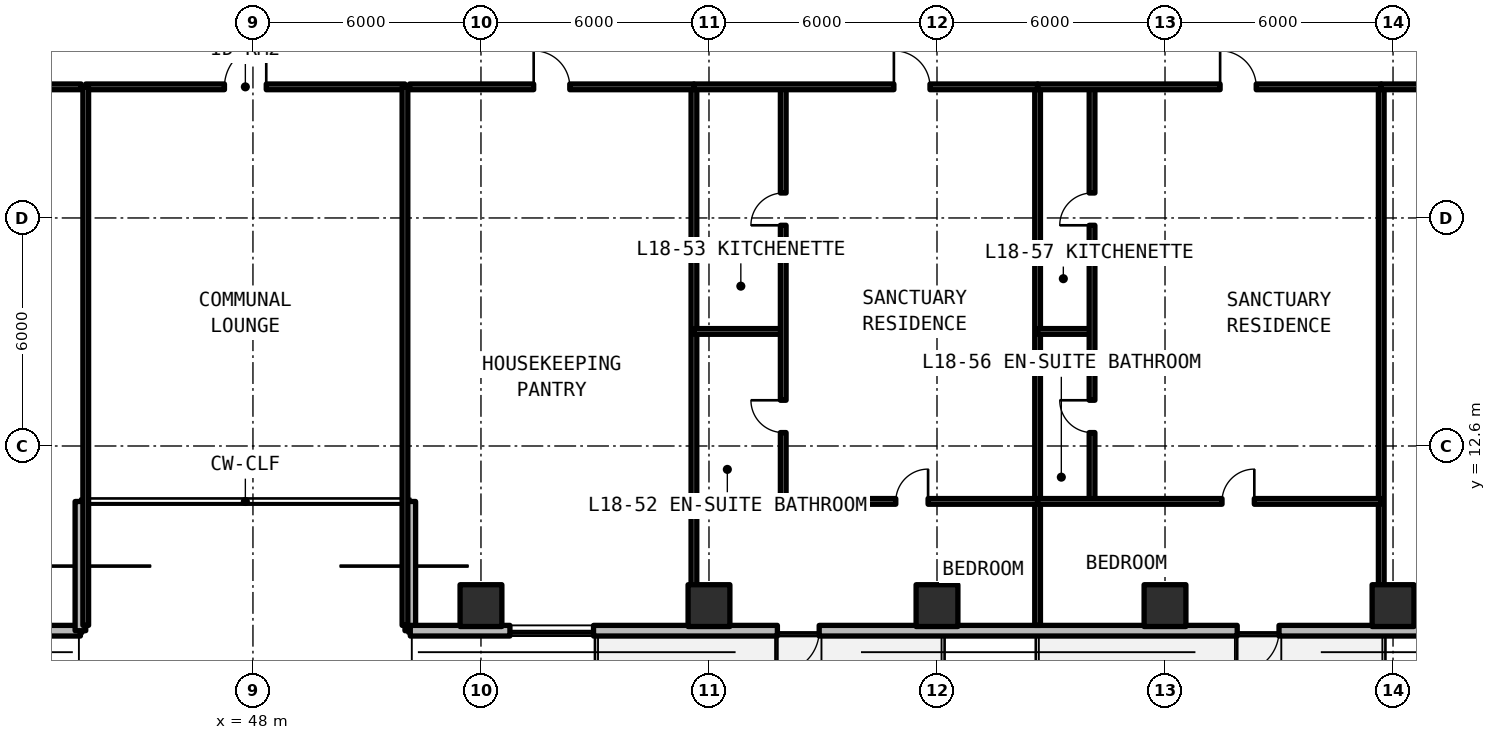
"""IFC4 building model, lengths in metres.
Left out: names, types, materials, properties, quantities, classifications, styles, units other than length and angle.
Written with IfcOpenShell. Run it as: python <this file> out.ifc"""

import sys

from ifc_helpers import new_model, si_unit, direction, frame, frame_2d, origin, origin_2d, place, context, subcontext, project, spatial, rectangle, extrude, element, fill, save


model = new_model("IFC4")
c1 = context("Model", 3, precision=1e-05, world=origin(), true_north=direction((0.0, 1.0)))
c2 = subcontext(c1, "Body", "Model", "MODEL_VIEW")
j1 = project(units=[si_unit("LENGTHUNIT", "METRE"), si_unit("PLANEANGLEUNIT", "RADIAN")], contexts=[c1])
p1 = place(None, origin())
s1 = spatial("IfcSite", under=j1, at=p1, CompositionType="ELEMENT")
p2 = place(p1, origin())
s2 = spatial("IfcBuilding", under=s1, at=p2, CompositionType="ELEMENT")
p3 = place(p2, frame((0.0, 0.0, 66.0)))
s3 = spatial("IfcBuildingStorey", under=s2, at=p3, CompositionType="ELEMENT", Elevation=66.0)
for number, where, z_axis, x_axis in (
    (1, (54.0, 8.4, 0.0), (0.0, 0.0, 1.0), (1.0, 0.0, 0.0)),
    (2, (60.0, 8.4, 0.0), (0.0, 0.0, 1.0), (1.0, 0.0, 0.0)),
    (3, (66.0, 8.4, 0.0), (0.0, 0.0, 1.0), (1.0, 0.0, 0.0)),
    (4, (72.0, 8.4, 0.0), (0.0, 0.0, 1.0), (1.0, 0.0, 0.0)),
    (5, (78.0, 8.4, 0.0), (0.0, 0.0, 1.0), (1.0, 0.0, 0.0)),
):
    element("IfcColumn", number, at=place(p3, frame(where, z_axis=z_axis, x_axis=x_axis)), inside=s3, PredefinedType="COLUMN", context=c2, shape_type="SweptSolid", body=[
        extrude(rectangle(XDim=1.1, YDim=1.1, at=origin_2d()), origin(), (0.0, 0.0, 1.0), 3.63),
    ])
p4 = place(p3, frame((20.858, 7.74, 0.0), z_axis=(0.0, 0.0, 1.0), x_axis=(1.0, 0.0, 0.0)))
e6 = element("IfcWall", 6, at=p4, inside=s3, PredefinedType="SOLIDWALL", context=c2, shape_type="SweptSolid", body=[
    extrude(rectangle(XDim=22.602, YDim=0.28, at=frame_2d((11.301, 0.0))), origin(), (0.0, 0.0, 1.0), 3.41),
])
p5 = place(p4, frame((6.142, 0.0, 0.0)))
e7 = element("IfcOpeningElement", 7, at=p5, cuts=e6, PredefinedType="OPENING", context=c2, shape_type="SweptSolid", body=[
    extrude(rectangle(XDim=1.1, YDim=2.15, at=frame_2d((0.55, 1.075))), frame((0.0, 0.15, 0.0), z_axis=(0.0, -1.0, 0.0), x_axis=(1.0, 0.0, 0.0)), (0.0, 0.0, 1.0), 0.3),
])
p6 = place(p4, frame((0.879, 0.0, 0.78)))
e8 = element("IfcOpeningElement", 8, at=p6, cuts=e6, PredefinedType="OPENING", context=c2, shape_type="SweptSolid", body=[
    extrude(rectangle(XDim=1.4, YDim=1.65, at=frame_2d((0.7, 0.825))), frame((0.0, 0.15, 0.0), z_axis=(0.0, -1.0, 0.0), x_axis=(1.0, 0.0, 0.0)), (0.0, 0.0, 1.0), 0.3),
])
p7 = place(p4, frame((12.827, 0.0, 0.78)))
e9 = element("IfcOpeningElement", 9, at=p7, cuts=e6, PredefinedType="OPENING", context=c2, shape_type="SweptSolid", body=[
    extrude(rectangle(XDim=1.4, YDim=1.65, at=frame_2d((0.7, 0.825))), frame((0.0, 0.15, 0.0), z_axis=(0.0, -1.0, 0.0), x_axis=(1.0, 0.0, 0.0)), (0.0, 0.0, 1.0), 0.3),
])
p8 = place(p4, frame((18.165, 0.0, 0.78)))
e10 = element("IfcOpeningElement", 10, at=p8, cuts=e6, PredefinedType="OPENING", context=c2, shape_type="SweptSolid", body=[
    extrude(rectangle(XDim=2.2, YDim=1.66, at=frame_2d((1.1, 0.83))), frame((0.0, 0.15, 0.0), z_axis=(0.0, -1.0, 0.0), x_axis=(1.0, 0.0, 0.0)), (0.0, 0.0, 1.0), 0.3),
])
for number, where, z_axis, x_axis in (
    (11, (43.46, 7.74, 0.0), (0.0, 0.0, 1.0), (0.0, 1.0, 0.0)),
    (12, (52.14, 11.14, 0.0), (0.0, 0.0, 1.0), (0.0, -1.0, 0.0)),
):
    element("IfcWall", number, at=place(p3, frame(where, z_axis=z_axis, x_axis=x_axis)), inside=s3, PredefinedType="SOLIDWALL", context=c2, shape_type="SweptSolid", body=[
        extrude(rectangle(XDim=3.4, YDim=0.28, at=frame_2d((1.7, 0.0))), origin(), (0.0, 0.0, 1.0), 3.41),
    ])
p9 = place(p3, frame((52.14, 7.74, 0.0), z_axis=(0.0, 0.0, 1.0), x_axis=(1.0, 0.0, 0.0)))
e13 = element("IfcWall", 13, at=p9, inside=s3, PredefinedType="SOLIDWALL", context=c2, shape_type="SweptSolid", body=[
    extrude(rectangle(XDim=44.402, YDim=0.28, at=frame_2d((22.201, 0.0))), origin(), (0.0, 0.0, 1.0), 3.41),
])
p10 = place(p9, frame((9.66, 0.0, 0.0)))
e14 = element("IfcOpeningElement", 14, at=p10, cuts=e13, PredefinedType="OPENING", context=c2, shape_type="SweptSolid", body=[
    extrude(rectangle(XDim=1.1, YDim=2.15, at=frame_2d((0.55, 1.075))), frame((0.0, 0.15, 0.0), z_axis=(0.0, -1.0, 0.0), x_axis=(1.0, 0.0, 0.0)), (0.0, 0.0, 1.0), 0.3),
])
p11 = place(p9, frame((21.76, 0.0, 0.0)))
e15 = element("IfcOpeningElement", 15, at=p11, cuts=e13, PredefinedType="OPENING", context=c2, shape_type="SweptSolid", body=[
    extrude(rectangle(XDim=1.1, YDim=2.15, at=frame_2d((0.55, 1.075))), frame((0.0, 0.15, 0.0), z_axis=(0.0, -1.0, 0.0), x_axis=(1.0, 0.0, 0.0)), (0.0, 0.0, 1.0), 0.3),
])
p12 = place(p9, frame((33.61, 0.0, 0.0)))
e16 = element("IfcOpeningElement", 16, at=p12, cuts=e13, PredefinedType="OPENING", context=c2, shape_type="SweptSolid", body=[
    extrude(rectangle(XDim=1.1, YDim=2.15, at=frame_2d((0.55, 1.075))), frame((0.0, 0.15, 0.0), z_axis=(0.0, -1.0, 0.0), x_axis=(1.0, 0.0, 0.0)), (0.0, 0.0, 1.0), 0.3),
])
p13 = place(p9, frame((2.622, 0.0, 0.78)))
e17 = element("IfcOpeningElement", 17, at=p13, cuts=e13, PredefinedType="OPENING", context=c2, shape_type="SweptSolid", body=[
    extrude(rectangle(XDim=2.2, YDim=1.66, at=frame_2d((1.1, 0.83))), frame((0.0, 0.15, 0.0), z_axis=(0.0, -1.0, 0.0), x_axis=(1.0, 0.0, 0.0)), (0.0, 0.0, 1.0), 0.3),
])
p14 = place(p9, frame((38.638, 0.0, 0.78)))
e18 = element("IfcOpeningElement", 18, at=p14, cuts=e13, PredefinedType="OPENING", context=c2, shape_type="SweptSolid", body=[
    extrude(rectangle(XDim=2.2, YDim=1.66, at=frame_2d((1.1, 0.83))), frame((0.0, 0.15, 0.0), z_axis=(0.0, -1.0, 0.0), x_axis=(1.0, 0.0, 0.0)), (0.0, 0.0, 1.0), 0.3),
])
p15 = place(p3, frame((43.6, 22.05, 0.0), z_axis=(0.0, 0.0, 1.0), x_axis=(1.0, 0.0, 0.0)))
e19 = element("IfcWall", 19, at=p15, inside=s3, PredefinedType="SOLIDWALL", context=c2, shape_type="SweptSolid", body=[
    extrude(rectangle(XDim=8.4, YDim=0.15, at=frame_2d((4.2, 0.0))), origin(), (0.0, 0.0, 1.0), 2.63),
])
p16 = place(p15, frame((3.65, 0.0, 0.0)))
e20 = element("IfcOpeningElement", 20, at=p16, cuts=e19, PredefinedType="OPENING", context=c2, shape_type="SweptSolid", body=[
    extrude(rectangle(XDim=1.1, YDim=2.15, at=frame_2d((0.55, 1.075))), frame((0.0, 0.085, 0.0), z_axis=(0.0, -1.0, 0.0), x_axis=(1.0, 0.0, 0.0)), (0.0, 0.0, 1.0), 0.17),
])
for number, where, z_axis, x_axis in (
    (21, (43.6, 7.88, 0.0), (0.0, 0.0, 1.0), (0.0, 1.0, 0.0)),
    (22, (52.0, 7.88, 0.0), (0.0, 0.0, 1.0), (0.0, 1.0, 0.0)),
):
    element("IfcWall", number, at=place(p3, frame(where, z_axis=z_axis, x_axis=x_axis)), inside=s3, PredefinedType="SOLIDWALL", context=c2, shape_type="SweptSolid", body=[
        extrude(rectangle(XDim=14.17, YDim=0.15, at=frame_2d((7.085, 0.0))), origin(), (0.0, 0.0, 1.0), 2.63),
    ])
p17 = place(p3, frame((38.046, 22.05, 0.0), z_axis=(0.0, 0.0, 1.0), x_axis=(1.0, 0.0, 0.0)))
e23 = element("IfcWall", 23, at=p17, inside=s3, PredefinedType="SOLIDWALL", context=c2, shape_type="SweptSolid", body=[
    extrude(rectangle(XDim=5.434, YDim=0.15, at=frame_2d((2.717, 0.0))), origin(), (0.0, 0.0, 1.0), 2.63),
])
p18 = place(p17, frame((2.167, 0.0, 0.0)))
e24 = element("IfcOpeningElement", 24, at=p18, cuts=e23, PredefinedType="OPENING", context=c2, shape_type="SweptSolid", body=[
    extrude(rectangle(XDim=1.1, YDim=2.15, at=frame_2d((0.55, 1.075))), frame((0.0, 0.085, 0.0), z_axis=(0.0, -1.0, 0.0), x_axis=(1.0, 0.0, 0.0)), (0.0, 0.0, 1.0), 0.17),
])
p19 = place(p3, frame((59.604, 7.88, 0.0), z_axis=(0.0, 0.0, 1.0), x_axis=(0.0, 1.0, 0.0)))
e25 = element("IfcWall", 25, at=p19, inside=s3, PredefinedType="SOLIDWALL", context=c2, shape_type="SweptSolid", body=[
    extrude(rectangle(XDim=14.17, YDim=0.15, at=frame_2d((7.085, 0.0))), origin(), (0.0, 0.0, 1.0), 2.63),
])
p20 = place(p3, frame((52.12, 22.05, 0.0), z_axis=(0.0, 0.0, 1.0), x_axis=(1.0, 0.0, 0.0)))
e26 = element("IfcWall", 26, at=p20, inside=s3, PredefinedType="SOLIDWALL", context=c2, shape_type="SweptSolid", body=[
    extrude(rectangle(XDim=7.484, YDim=0.15, at=frame_2d((3.742, 0.0))), origin(), (0.0, 0.0, 1.0), 2.63),
])
p21 = place(p20, frame((3.267, 0.0, 0.0)))
e27 = element("IfcOpeningElement", 27, at=p21, cuts=e26, PredefinedType="OPENING", context=c2, shape_type="SweptSolid", body=[
    extrude(rectangle(XDim=0.95, YDim=2.15, at=frame_2d((0.475, 1.075))), frame((0.0, 0.085, 0.0), z_axis=(0.0, -1.0, 0.0), x_axis=(1.0, 0.0, 0.0)), (0.0, 0.0, 1.0), 0.17),
])
p22 = place(p3, frame((68.647, 7.88, 0.0), z_axis=(0.0, 0.0, 1.0), x_axis=(0.0, 1.0, 0.0)))
e28 = element("IfcWall", 28, at=p22, inside=s3, PredefinedType="SOLIDWALL", context=c2, shape_type="SweptSolid", body=[
    extrude(rectangle(XDim=14.17, YDim=0.15, at=frame_2d((7.085, 0.0))), origin(), (0.0, 0.0, 1.0), 2.63),
])
p23 = place(p3, frame((59.604, 15.615, 0.0), z_axis=(0.0, 0.0, 1.0), x_axis=(1.0, 0.0, 0.0)))
e29 = element("IfcWall", 29, at=p23, inside=s3, PredefinedType="PARTITIONING", context=c2, shape_type="SweptSolid", body=[
    extrude(rectangle(XDim=2.35, YDim=0.15, at=frame_2d((1.175, 0.0))), origin(), (0.0, 0.0, 1.0), 2.63),
])
p24 = place(p3, frame((61.954, 11.142, 0.0), z_axis=(0.0, 0.0, 1.0), x_axis=(0.0, 1.0, 0.0)))
e30 = element("IfcWall", 30, at=p24, inside=s3, PredefinedType="PARTITIONING", context=c2, shape_type="SweptSolid", body=[
    extrude(rectangle(XDim=10.908, YDim=0.15, at=frame_2d((5.454, 0.0))), origin(), (0.0, 0.0, 1.0), 2.63),
])
p25 = place(p24, frame((1.811, 0.0, 0.0)))
e31 = element("IfcOpeningElement", 31, at=p25, cuts=e30, PredefinedType="OPENING", context=c2, shape_type="SweptSolid", body=[
    extrude(rectangle(XDim=0.85, YDim=2.1, at=frame_2d((0.425, 1.05))), frame((0.0, 0.085, 0.0), z_axis=(0.0, -1.0, 0.0), x_axis=(1.0, 0.0, 0.0)), (0.0, 0.0, 1.0), 0.17),
])
p26 = place(p24, frame((7.265, 0.0, 0.0)))
e32 = element("IfcOpeningElement", 32, at=p26, cuts=e30, PredefinedType="OPENING", context=c2, shape_type="SweptSolid", body=[
    extrude(rectangle(XDim=0.85, YDim=2.1, at=frame_2d((0.425, 1.05))), frame((0.0, 0.085, 0.0), z_axis=(0.0, -1.0, 0.0), x_axis=(1.0, 0.0, 0.0)), (0.0, 0.0, 1.0), 0.17),
])
p27 = place(p3, frame((59.604, 11.142, 0.0), z_axis=(0.0, 0.0, 1.0), x_axis=(1.0, 0.0, 0.0)))
e33 = element("IfcWall", 33, at=p27, inside=s3, PredefinedType="PARTITIONING", context=c2, shape_type="SweptSolid", body=[
    extrude(rectangle(XDim=9.043, YDim=0.15, at=frame_2d((4.521, 0.0))), origin(), (0.0, 0.0, 1.0), 2.63),
])
p28 = place(p27, frame((5.312, 0.0, 0.0)))
e34 = element("IfcOpeningElement", 34, at=p28, cuts=e33, PredefinedType="OPENING", context=c2, shape_type="SweptSolid", body=[
    extrude(rectangle(XDim=0.85, YDim=2.1, at=frame_2d((0.425, 1.05))), frame((0.0, 0.085, 0.0), z_axis=(0.0, -1.0, 0.0), x_axis=(1.0, 0.0, 0.0)), (0.0, 0.0, 1.0), 0.17),
])
p29 = place(p3, frame((59.604, 22.05, 0.0), z_axis=(0.0, 0.0, 1.0), x_axis=(1.0, 0.0, 0.0)))
e35 = element("IfcWall", 35, at=p29, inside=s3, PredefinedType="SOLIDWALL", context=c2, shape_type="SweptSolid", body=[
    extrude(rectangle(XDim=9.043, YDim=0.15, at=frame_2d((4.521, 0.0))), origin(), (0.0, 0.0, 1.0), 2.63),
])
p30 = place(p29, frame((5.262, 0.0, 0.0)))
e36 = element("IfcOpeningElement", 36, at=p30, cuts=e35, PredefinedType="OPENING", context=c2, shape_type="SweptSolid", body=[
    extrude(rectangle(XDim=0.95, YDim=2.15, at=frame_2d((0.475, 1.075))), frame((0.0, 0.085, 0.0), z_axis=(0.0, -1.0, 0.0), x_axis=(1.0, 0.0, 0.0)), (0.0, 0.0, 1.0), 0.17),
])
p31 = place(p3, frame((77.69, 7.88, 0.0), z_axis=(0.0, 0.0, 1.0), x_axis=(0.0, 1.0, 0.0)))
e37 = element("IfcWall", 37, at=p31, inside=s3, PredefinedType="SOLIDWALL", context=c2, shape_type="SweptSolid", body=[
    extrude(rectangle(XDim=14.17, YDim=0.15, at=frame_2d((7.085, 0.0))), origin(), (0.0, 0.0, 1.0), 2.63),
])
p32 = place(p3, frame((68.647, 15.615, 0.0), z_axis=(0.0, 0.0, 1.0), x_axis=(1.0, 0.0, 0.0)))
e38 = element("IfcWall", 38, at=p32, inside=s3, PredefinedType="PARTITIONING", context=c2, shape_type="SweptSolid", body=[
    extrude(rectangle(XDim=1.433, YDim=0.15, at=frame_2d((0.717, 0.0))), origin(), (0.0, 0.0, 1.0), 2.63),
])
p33 = place(p3, frame((70.08, 11.142, 0.0), z_axis=(0.0, 0.0, 1.0), x_axis=(0.0, 1.0, 0.0)))
e39 = element("IfcWall", 39, at=p33, inside=s3, PredefinedType="PARTITIONING", context=c2, shape_type="SweptSolid", body=[
    extrude(rectangle(XDim=10.908, YDim=0.15, at=frame_2d((5.454, 0.0))), origin(), (0.0, 0.0, 1.0), 2.63),
])
p34 = place(p33, frame((1.811, 0.0, 0.0)))
e40 = element("IfcOpeningElement", 40, at=p34, cuts=e39, PredefinedType="OPENING", context=c2, shape_type="SweptSolid", body=[
    extrude(rectangle(XDim=0.85, YDim=2.1, at=frame_2d((0.425, 1.05))), frame((0.0, 0.085, 0.0), z_axis=(0.0, -1.0, 0.0), x_axis=(1.0, 0.0, 0.0)), (0.0, 0.0, 1.0), 0.17),
])
p35 = place(p33, frame((7.265, 0.0, 0.0)))
e41 = element("IfcOpeningElement", 41, at=p35, cuts=e39, PredefinedType="OPENING", context=c2, shape_type="SweptSolid", body=[
    extrude(rectangle(XDim=0.85, YDim=2.1, at=frame_2d((0.425, 1.05))), frame((0.0, 0.085, 0.0), z_axis=(0.0, -1.0, 0.0), x_axis=(1.0, 0.0, 0.0)), (0.0, 0.0, 1.0), 0.17),
])
p36 = place(p3, frame((68.647, 11.142, 0.0), z_axis=(0.0, 0.0, 1.0), x_axis=(1.0, 0.0, 0.0)))
e42 = element("IfcWall", 42, at=p36, inside=s3, PredefinedType="PARTITIONING", context=c2, shape_type="SweptSolid", body=[
    extrude(rectangle(XDim=9.043, YDim=0.15, at=frame_2d((4.521, 0.0))), origin(), (0.0, 0.0, 1.0), 2.63),
])
p37 = place(p36, frame((4.853, 0.0, 0.0)))
e43 = element("IfcOpeningElement", 43, at=p37, cuts=e42, PredefinedType="OPENING", context=c2, shape_type="SweptSolid", body=[
    extrude(rectangle(XDim=0.85, YDim=2.1, at=frame_2d((0.425, 1.05))), frame((0.0, 0.085, 0.0), z_axis=(0.0, -1.0, 0.0), x_axis=(1.0, 0.0, 0.0)), (0.0, 0.0, 1.0), 0.17),
])
p38 = place(p3, frame((68.647, 22.05, 0.0), z_axis=(0.0, 0.0, 1.0), x_axis=(1.0, 0.0, 0.0)))
e44 = element("IfcWall", 44, at=p38, inside=s3, PredefinedType="SOLIDWALL", context=c2, shape_type="SweptSolid", body=[
    extrude(rectangle(XDim=9.043, YDim=0.15, at=frame_2d((4.521, 0.0))), origin(), (0.0, 0.0, 1.0), 2.63),
])
p39 = place(p38, frame((4.803, 0.0, 0.0)))
e45 = element("IfcOpeningElement", 45, at=p39, cuts=e44, PredefinedType="OPENING", context=c2, shape_type="SweptSolid", body=[
    extrude(rectangle(XDim=0.95, YDim=2.15, at=frame_2d((0.475, 1.075))), frame((0.0, 0.085, 0.0), z_axis=(0.0, -1.0, 0.0), x_axis=(1.0, 0.0, 0.0)), (0.0, 0.0, 1.0), 0.17),
])
p40 = place(p3, frame((77.69, 22.05, 0.0), z_axis=(0.0, 0.0, 1.0), x_axis=(1.0, 0.0, 0.0)))
e46 = element("IfcWall", 46, at=p40, inside=s3, PredefinedType="SOLIDWALL", context=c2, shape_type="SweptSolid", body=[
    extrude(rectangle(XDim=9.667, YDim=0.15, at=frame_2d((4.833, 0.0))), origin(), (0.0, 0.0, 1.0), 2.63),
])
p41 = place(p40, frame((4.283, 0.0, 0.0)))
e47 = element("IfcOpeningElement", 47, at=p41, cuts=e46, PredefinedType="OPENING", context=c2, shape_type="SweptSolid", body=[
    extrude(rectangle(XDim=1.1, YDim=2.15, at=frame_2d((0.55, 1.075))), frame((0.0, 0.085, 0.0), z_axis=(0.0, -1.0, 0.0), x_axis=(1.0, 0.0, 0.0)), (0.0, 0.0, 1.0), 0.17),
])
p42 = place(p10, frame((1.1, 0.0, 0.0), z_axis=(0.0, 0.0, 1.0), x_axis=(-1.0, 0.0, 0.0)))
e48 = element("IfcDoor", 48, at=p42, inside=s3, OperationType="SINGLE_SWING_LEFT", PredefinedType="DOOR", context=c2, shape_type="SweptSolid", body=[
    extrude(rectangle(XDim=1.1, YDim=2.15, at=frame_2d((0.55, 1.075))), frame((0.0, 0.025, 0.0), z_axis=(0.0, -1.0, 0.0), x_axis=(1.0, 0.0, 0.0)), (0.0, 0.0, 1.0), 0.05),
])
fill(e14, e48)
p43 = place(p11, frame((1.1, 0.0, 0.0), z_axis=(0.0, 0.0, 1.0), x_axis=(-1.0, 0.0, 0.0)))
e49 = element("IfcDoor", 49, at=p43, inside=s3, OperationType="SINGLE_SWING_RIGHT", PredefinedType="DOOR", context=c2, shape_type="SweptSolid", body=[
    extrude(rectangle(XDim=1.1, YDim=2.15, at=frame_2d((0.55, 1.075))), frame((0.0, 0.025, 0.0), z_axis=(0.0, -1.0, 0.0), x_axis=(1.0, 0.0, 0.0)), (0.0, 0.0, 1.0), 0.05),
])
fill(e15, e49)
p44 = place(p13, origin())
e50 = element("IfcWindow", 50, at=p44, inside=s3, PartitioningType="SINGLE_PANEL", PredefinedType="WINDOW", context=c2, shape_type="SweptSolid", body=[
    extrude(rectangle(XDim=2.2, YDim=1.66, at=frame_2d((1.1, 0.83))), frame((0.0, 0.03, 0.0), z_axis=(0.0, -1.0, 0.0), x_axis=(1.0, 0.0, 0.0)), (0.0, 0.0, 1.0), 0.06),
])
fill(e17, e50)
p45 = place(p16, origin())
e51 = element("IfcDoor", 51, at=p45, inside=s3, OperationType="SINGLE_SWING_RIGHT", PredefinedType="DOOR", context=c2, shape_type="SweptSolid", body=[
    extrude(rectangle(XDim=1.1, YDim=2.15, at=frame_2d((0.55, 1.075))), frame((0.0, 0.025, 0.0), z_axis=(0.0, -1.0, 0.0), x_axis=(1.0, 0.0, 0.0)), (0.0, 0.0, 1.0), 0.05),
])
fill(e20, e51)
p46 = place(p21, origin())
e52 = element("IfcDoor", 52, at=p46, inside=s3, OperationType="SINGLE_SWING_LEFT", PredefinedType="DOOR", context=c2, shape_type="SweptSolid", body=[
    extrude(rectangle(XDim=0.95, YDim=2.15, at=frame_2d((0.475, 1.075))), frame((0.0, 0.025, 0.0), z_axis=(0.0, -1.0, 0.0), x_axis=(1.0, 0.0, 0.0)), (0.0, 0.0, 1.0), 0.05),
])
fill(e27, e52)
p47 = place(p25, origin())
e53 = element("IfcDoor", 53, at=p47, inside=s3, OperationType="SINGLE_SWING_RIGHT", PredefinedType="DOOR", context=c2, shape_type="SweptSolid", body=[
    extrude(rectangle(XDim=0.85, YDim=2.1, at=frame_2d((0.425, 1.05))), frame((0.0, 0.025, 0.0), z_axis=(0.0, -1.0, 0.0), x_axis=(1.0, 0.0, 0.0)), (0.0, 0.0, 1.0), 0.05),
])
fill(e31, e53)
p48 = place(p26, origin())
e54 = element("IfcDoor", 54, at=p48, inside=s3, OperationType="SINGLE_SWING_LEFT", PredefinedType="DOOR", context=c2, shape_type="SweptSolid", body=[
    extrude(rectangle(XDim=0.85, YDim=2.1, at=frame_2d((0.425, 1.05))), frame((0.0, 0.025, 0.0), z_axis=(0.0, -1.0, 0.0), x_axis=(1.0, 0.0, 0.0)), (0.0, 0.0, 1.0), 0.05),
])
fill(e32, e54)
p49 = place(p28, origin())
e55 = element("IfcDoor", 55, at=p49, inside=s3, OperationType="SINGLE_SWING_RIGHT", PredefinedType="DOOR", context=c2, shape_type="SweptSolid", body=[
    extrude(rectangle(XDim=0.85, YDim=2.1, at=frame_2d((0.425, 1.05))), frame((0.0, 0.025, 0.0), z_axis=(0.0, -1.0, 0.0), x_axis=(1.0, 0.0, 0.0)), (0.0, 0.0, 1.0), 0.05),
])
fill(e34, e55)
p50 = place(p30, origin())
e56 = element("IfcDoor", 56, at=p50, inside=s3, OperationType="SINGLE_SWING_LEFT", PredefinedType="DOOR", context=c2, shape_type="SweptSolid", body=[
    extrude(rectangle(XDim=0.95, YDim=2.15, at=frame_2d((0.475, 1.075))), frame((0.0, 0.025, 0.0), z_axis=(0.0, -1.0, 0.0), x_axis=(1.0, 0.0, 0.0)), (0.0, 0.0, 1.0), 0.05),
])
fill(e36, e56)
p51 = place(p34, origin())
e57 = element("IfcDoor", 57, at=p51, inside=s3, OperationType="SINGLE_SWING_RIGHT", PredefinedType="DOOR", context=c2, shape_type="SweptSolid", body=[
    extrude(rectangle(XDim=0.85, YDim=2.1, at=frame_2d((0.425, 1.05))), frame((0.0, 0.025, 0.0), z_axis=(0.0, -1.0, 0.0), x_axis=(1.0, 0.0, 0.0)), (0.0, 0.0, 1.0), 0.05),
])
fill(e40, e57)
p52 = place(p35, origin())
e58 = element("IfcDoor", 58, at=p52, inside=s3, OperationType="SINGLE_SWING_LEFT", PredefinedType="DOOR", context=c2, shape_type="SweptSolid", body=[
    extrude(rectangle(XDim=0.85, YDim=2.1, at=frame_2d((0.425, 1.05))), frame((0.0, 0.025, 0.0), z_axis=(0.0, -1.0, 0.0), x_axis=(1.0, 0.0, 0.0)), (0.0, 0.0, 1.0), 0.05),
])
fill(e41, e58)
p53 = place(p37, origin())
e59 = element("IfcDoor", 59, at=p53, inside=s3, OperationType="SINGLE_SWING_RIGHT", PredefinedType="DOOR", context=c2, shape_type="SweptSolid", body=[
    extrude(rectangle(XDim=0.85, YDim=2.1, at=frame_2d((0.425, 1.05))), frame((0.0, 0.025, 0.0), z_axis=(0.0, -1.0, 0.0), x_axis=(1.0, 0.0, 0.0)), (0.0, 0.0, 1.0), 0.05),
])
fill(e43, e59)
p54 = place(p39, origin())
e60 = element("IfcDoor", 60, at=p54, inside=s3, OperationType="SINGLE_SWING_LEFT", PredefinedType="DOOR", context=c2, shape_type="SweptSolid", body=[
    extrude(rectangle(XDim=0.95, YDim=2.15, at=frame_2d((0.475, 1.075))), frame((0.0, 0.025, 0.0), z_axis=(0.0, -1.0, 0.0), x_axis=(1.0, 0.0, 0.0)), (0.0, 0.0, 1.0), 0.05),
])
fill(e45, e60)
save(model, sys.argv[1])
